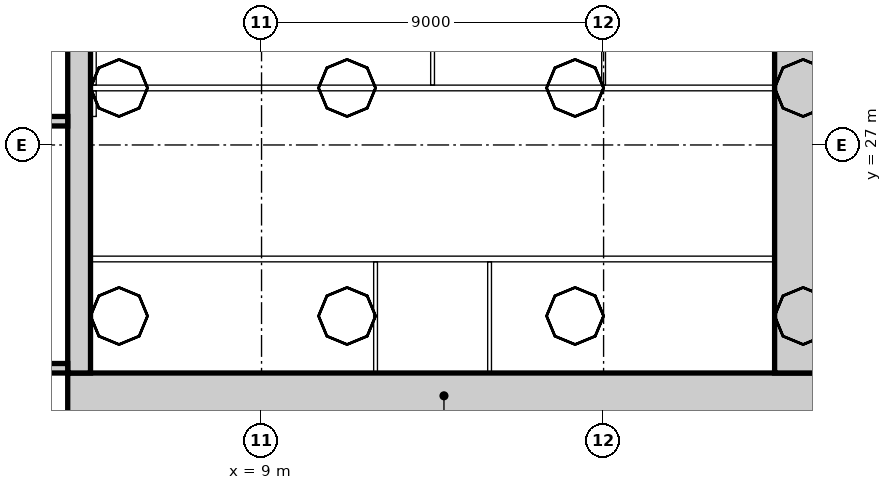
"""IFC4 building model, lengths in metres.
Left out: names, types, materials, properties, quantities, classifications, styles, units other than length and angle.
Written with IfcOpenShell. Run it as: python <this file> out.ifc"""

import sys

from ifc_helpers import new_model, si_unit, direction, frame, frame_2d, origin, place, context, subcontext, project, spatial, rectangle, extrude, element, fill, save


model = new_model("IFC4")
c1 = context("Model", 3, precision=1e-05, world=origin(), true_north=direction((0.0, 1.0)))
c2 = subcontext(c1, "Body", "Model", "MODEL_VIEW")
j1 = project(units=[si_unit("LENGTHUNIT", "METRE"), si_unit("PLANEANGLEUNIT", "RADIAN")], contexts=[c1])
p1 = place(None, origin())
s1 = spatial("IfcSite", under=j1, at=p1, CompositionType="ELEMENT")
p2 = place(p1, origin())
s2 = spatial("IfcBuilding", under=s1, at=p2, CompositionType="ELEMENT")
p3 = place(p2, frame((0.0, 0.0, -14.0)))
s3 = spatial("IfcBuildingStorey", under=s2, at=p3, CompositionType="ELEMENT", Elevation=-14.0)
p4 = place(p3, frame((3.9, 20.4, 0.0), z_axis=(0.0, 0.0, 1.0), x_axis=(1.0, 0.0, 0.0)))
e1 = element("IfcWall", 1, at=p4, inside=s3, PredefinedType="SOLIDWALL", context=c2, shape_type="SweptSolid", body=[
    extrude(rectangle(XDim=19.8, YDim=1.2, at=frame_2d((9.9, 0.0))), origin(), (0.0, 0.0, 1.0), 4.5),
])
p5 = place(p3, frame((23.1, 21.0, 0.0), z_axis=(0.0, 0.0, 1.0), x_axis=(0.0, 1.0, 0.0)))
e2 = element("IfcWall", 2, at=p5, inside=s3, PredefinedType="SOLIDWALL", context=c2, shape_type="SweptSolid", body=[
    extrude(rectangle(XDim=10.5, YDim=1.2, at=frame_2d((5.25, 0.0))), origin(), (0.0, 0.0, 1.0), 4.5),
])
p6 = place(p5, frame((4.35, 0.0, 0.0)))
e3 = element("IfcOpeningElement", 3, at=p6, cuts=e2, PredefinedType="OPENING", context=c2, shape_type="SweptSolid", body=[
    extrude(rectangle(XDim=1.8, YDim=2.1, at=frame_2d((0.9, 1.05))), frame((0.0, 0.61, 0.0), z_axis=(0.0, -1.0, 0.0), x_axis=(1.0, 0.0, 0.0)), (0.0, 0.0, 1.0), 1.22),
])
p7 = place(p3, frame((4.2, 31.5, 0.0), z_axis=(0.0, 0.0, 1.0), x_axis=(0.0, -1.0, 0.0)))
e4 = element("IfcWall", 4, at=p7, inside=s3, PredefinedType="SOLIDWALL", context=c2, shape_type="SweptSolid", body=[
    extrude(rectangle(XDim=10.5, YDim=0.6, at=frame_2d((5.25, 0.0))), origin(), (0.0, 0.0, 1.0), 4.5),
])
for number, where, z_axis, x_axis in (
    (5, (0.36, 21.125, 0.0), (0.0, 0.0, 1.0), (1.0, 0.0, 0.0)),
    (6, (3.9, 27.625, 0.0), (0.0, 0.0, 1.0), (-1.0, 0.0, 0.0)),
):
    element("IfcWall", number, at=place(p3, frame(where, z_axis=z_axis, x_axis=x_axis)), inside=s3, PredefinedType="SOLIDWALL", context=c2, shape_type="SweptSolid", body=[
        extrude(rectangle(XDim=3.54, YDim=0.25, at=frame_2d((1.77, 0.0))), origin(), (0.0, 0.0, 1.0), 4.5),
    ])
p8 = place(p3, frame((4.5, 24.0, 0.0), z_axis=(0.0, 0.0, 1.0), x_axis=(1.0, 0.0, 0.0)))
e7 = element("IfcWall", 7, at=p8, inside=s3, PredefinedType="PARTITIONING", context=c2, shape_type="SweptSolid", body=[
    extrude(rectangle(XDim=18.0, YDim=0.15, at=frame_2d((9.0, 0.0))), origin(), (0.0, 0.0, 1.0), 4.15),
])
p9 = place(p8, frame((3.35, 0.0, 0.0)))
e8 = element("IfcOpeningElement", 8, at=p9, cuts=e7, PredefinedType="OPENING", context=c2, shape_type="SweptSolid", body=[
    extrude(rectangle(XDim=0.9, YDim=2.1, at=frame_2d((0.45, 1.05))), frame((0.0, 0.085, 0.0), z_axis=(0.0, -1.0, 0.0), x_axis=(1.0, 0.0, 0.0)), (0.0, 0.0, 1.0), 0.17),
])
p10 = place(p8, frame((8.55, 0.0, 0.0)))
e9 = element("IfcOpeningElement", 9, at=p10, cuts=e7, PredefinedType="OPENING", context=c2, shape_type="SweptSolid", body=[
    extrude(rectangle(XDim=0.9, YDim=2.1, at=frame_2d((0.45, 1.05))), frame((0.0, 0.085, 0.0), z_axis=(0.0, -1.0, 0.0), x_axis=(1.0, 0.0, 0.0)), (0.0, 0.0, 1.0), 0.17),
])
p11 = place(p8, frame((13.7, 0.0, 0.0)))
e10 = element("IfcOpeningElement", 10, at=p11, cuts=e7, PredefinedType="OPENING", context=c2, shape_type="SweptSolid", body=[
    extrude(rectangle(XDim=0.9, YDim=2.1, at=frame_2d((0.45, 1.05))), frame((0.0, 0.085, 0.0), z_axis=(0.0, -1.0, 0.0), x_axis=(1.0, 0.0, 0.0)), (0.0, 0.0, 1.0), 0.17),
])
p12 = place(p3, frame((4.5, 28.5, 0.0), z_axis=(0.0, 0.0, 1.0), x_axis=(1.0, 0.0, 0.0)))
e11 = element("IfcWall", 11, at=p12, inside=s3, PredefinedType="PARTITIONING", context=c2, shape_type="SweptSolid", body=[
    extrude(rectangle(XDim=18.0, YDim=0.15, at=frame_2d((9.0, 0.0))), origin(), (0.0, 0.0, 1.0), 4.15),
])
p13 = place(p12, frame((4.1, 0.0, 0.0)))
e12 = element("IfcOpeningElement", 12, at=p13, cuts=e11, PredefinedType="OPENING", context=c2, shape_type="SweptSolid", body=[
    extrude(rectangle(XDim=0.9, YDim=2.1, at=frame_2d((0.45, 1.05))), frame((0.0, 0.085, 0.0), z_axis=(0.0, -1.0, 0.0), x_axis=(1.0, 0.0, 0.0)), (0.0, 0.0, 1.0), 0.17),
])
p14 = place(p12, frame((10.8, 0.0, 0.0)))
e13 = element("IfcOpeningElement", 13, at=p14, cuts=e11, PredefinedType="OPENING", context=c2, shape_type="SweptSolid", body=[
    extrude(rectangle(XDim=0.9, YDim=2.1, at=frame_2d((0.45, 1.05))), frame((0.0, 0.085, 0.0), z_axis=(0.0, -1.0, 0.0), x_axis=(1.0, 0.0, 0.0)), (0.0, 0.0, 1.0), 0.17),
])
p15 = place(p12, frame((15.2, 0.0, 0.0)))
e14 = element("IfcOpeningElement", 14, at=p15, cuts=e11, PredefinedType="OPENING", context=c2, shape_type="SweptSolid", body=[
    extrude(rectangle(XDim=0.9, YDim=2.1, at=frame_2d((0.45, 1.05))), frame((0.0, 0.085, 0.0), z_axis=(0.0, -1.0, 0.0), x_axis=(1.0, 0.0, 0.0)), (0.0, 0.0, 1.0), 0.17),
])
p16 = place(p3, frame((4.575, 27.75, 0.0), z_axis=(0.0, 0.0, 1.0), x_axis=(0.0, 1.0, 0.0)))
e15 = element("IfcWall", 15, at=p16, inside=s3, PredefinedType="PARTITIONING", context=c2, shape_type="SweptSolid", body=[
    extrude(rectangle(XDim=0.675, YDim=0.15, at=frame_2d((0.338, 0.0))), origin(), (0.0, 0.0, 1.0), 4.15),
])
p17 = place(p3, frame((4.575, 28.575, 0.0), z_axis=(0.0, 0.0, 1.0), x_axis=(0.0, 1.0, 0.0)))
e16 = element("IfcWall", 16, at=p17, inside=s3, PredefinedType="PARTITIONING", context=c2, shape_type="SweptSolid", body=[
    extrude(rectangle(XDim=2.675, YDim=0.15, at=frame_2d((1.337, 0.0))), origin(), (0.0, 0.0, 1.0), 4.15),
])
p18 = place(p3, frame((12.0, 21.0, 0.0), z_axis=(0.0, 0.0, 1.0), x_axis=(0.0, 1.0, 0.0)))
e17 = element("IfcWall", 17, at=p18, inside=s3, PredefinedType="PARTITIONING", context=c2, shape_type="SweptSolid", body=[
    extrude(rectangle(XDim=2.925, YDim=0.1, at=frame_2d((1.462, 0.0))), origin(), (0.0, 0.0, 1.0), 4.15),
])
p19 = place(p3, frame((13.5, 28.575, 0.0), z_axis=(0.0, 0.0, 1.0), x_axis=(0.0, 1.0, 0.0)))
e18 = element("IfcWall", 18, at=p19, inside=s3, PredefinedType="PARTITIONING", context=c2, shape_type="SweptSolid", body=[
    extrude(rectangle(XDim=2.675, YDim=0.1, at=frame_2d((1.337, 0.0))), origin(), (0.0, 0.0, 1.0), 4.15),
])
p20 = place(p3, frame((15.0, 21.0, 0.0), z_axis=(0.0, 0.0, 1.0), x_axis=(0.0, 1.0, 0.0)))
e19 = element("IfcWall", 19, at=p20, inside=s3, PredefinedType="PARTITIONING", context=c2, shape_type="SweptSolid", body=[
    extrude(rectangle(XDim=2.925, YDim=0.1, at=frame_2d((1.462, 0.0))), origin(), (0.0, 0.0, 1.0), 4.15),
])
p21 = place(p3, frame((18.0, 28.575, 0.0), z_axis=(0.0, 0.0, 1.0), x_axis=(0.0, 1.0, 0.0)))
e20 = element("IfcWall", 20, at=p21, inside=s3, PredefinedType="PARTITIONING", context=c2, shape_type="SweptSolid", body=[
    extrude(rectangle(XDim=2.675, YDim=0.1, at=frame_2d((1.337, 0.0))), origin(), (0.0, 0.0, 1.0), 4.15),
])
p22 = place(p6, frame((1.8, 0.0, 0.0), z_axis=(0.0, 0.0, 1.0), x_axis=(-1.0, 0.0, 0.0)))
e21 = element("IfcDoor", 21, at=p22, inside=s3, OperationType="DOUBLE_DOOR_DOUBLE_SWING", PredefinedType="DOOR", context=c2, shape_type="SweptSolid", body=[
    extrude(rectangle(XDim=1.8, YDim=2.1, at=frame_2d((0.9, 1.05))), frame((0.0, 0.025, 0.0), z_axis=(0.0, -1.0, 0.0), x_axis=(1.0, 0.0, 0.0)), (0.0, 0.0, 1.0), 0.05),
])
fill(e3, e21)
p23 = place(p9, frame((0.9, 0.0, 0.0), z_axis=(0.0, 0.0, 1.0), x_axis=(-1.0, 0.0, 0.0)))
e22 = element("IfcDoor", 22, at=p23, inside=s3, OperationType="SINGLE_SWING_LEFT", PredefinedType="DOOR", context=c2, shape_type="SweptSolid", body=[
    extrude(rectangle(XDim=0.9, YDim=2.1, at=frame_2d((0.45, 1.05))), frame((0.0, 0.025, 0.0), z_axis=(0.0, -1.0, 0.0), x_axis=(1.0, 0.0, 0.0)), (0.0, 0.0, 1.0), 0.05),
])
fill(e8, e22)
p24 = place(p10, frame((0.9, 0.0, 0.0), z_axis=(0.0, 0.0, 1.0), x_axis=(-1.0, 0.0, 0.0)))
e23 = element("IfcDoor", 23, at=p24, inside=s3, OperationType="SINGLE_SWING_LEFT", PredefinedType="DOOR", context=c2, shape_type="SweptSolid", body=[
    extrude(rectangle(XDim=0.9, YDim=2.1, at=frame_2d((0.45, 1.05))), frame((0.0, 0.025, 0.0), z_axis=(0.0, -1.0, 0.0), x_axis=(1.0, 0.0, 0.0)), (0.0, 0.0, 1.0), 0.05),
])
fill(e9, e23)
p25 = place(p11, frame((0.9, 0.0, 0.0), z_axis=(0.0, 0.0, 1.0), x_axis=(-1.0, 0.0, 0.0)))
e24 = element("IfcDoor", 24, at=p25, inside=s3, OperationType="SINGLE_SWING_LEFT", PredefinedType="DOOR", context=c2, shape_type="SweptSolid", body=[
    extrude(rectangle(XDim=0.9, YDim=2.1, at=frame_2d((0.45, 1.05))), frame((0.0, 0.025, 0.0), z_axis=(0.0, -1.0, 0.0), x_axis=(1.0, 0.0, 0.0)), (0.0, 0.0, 1.0), 0.05),
])
fill(e10, e24)
p26 = place(p13, origin())
e25 = element("IfcDoor", 25, at=p26, inside=s3, OperationType="SINGLE_SWING_RIGHT", PredefinedType="DOOR", context=c2, shape_type="SweptSolid", body=[
    extrude(rectangle(XDim=0.9, YDim=2.1, at=frame_2d((0.45, 1.05))), frame((0.0, 0.025, 0.0), z_axis=(0.0, -1.0, 0.0), x_axis=(1.0, 0.0, 0.0)), (0.0, 0.0, 1.0), 0.05),
])
fill(e12, e25)
p27 = place(p14, origin())
e26 = element("IfcDoor", 26, at=p27, inside=s3, OperationType="SINGLE_SWING_LEFT", PredefinedType="DOOR", context=c2, shape_type="SweptSolid", body=[
    extrude(rectangle(XDim=0.9, YDim=2.1, at=frame_2d((0.45, 1.05))), frame((0.0, 0.025, 0.0), z_axis=(0.0, -1.0, 0.0), x_axis=(1.0, 0.0, 0.0)), (0.0, 0.0, 1.0), 0.05),
])
fill(e13, e26)
p28 = place(p15, origin())
e27 = element("IfcDoor", 27, at=p28, inside=s3, OperationType="SINGLE_SWING_RIGHT", PredefinedType="DOOR", context=c2, shape_type="SweptSolid", body=[
    extrude(rectangle(XDim=0.9, YDim=2.1, at=frame_2d((0.45, 1.05))), frame((0.0, 0.025, 0.0), z_axis=(0.0, -1.0, 0.0), x_axis=(1.0, 0.0, 0.0)), (0.0, 0.0, 1.0), 0.05),
])
fill(e14, e27)
save(model, sys.argv[1])
